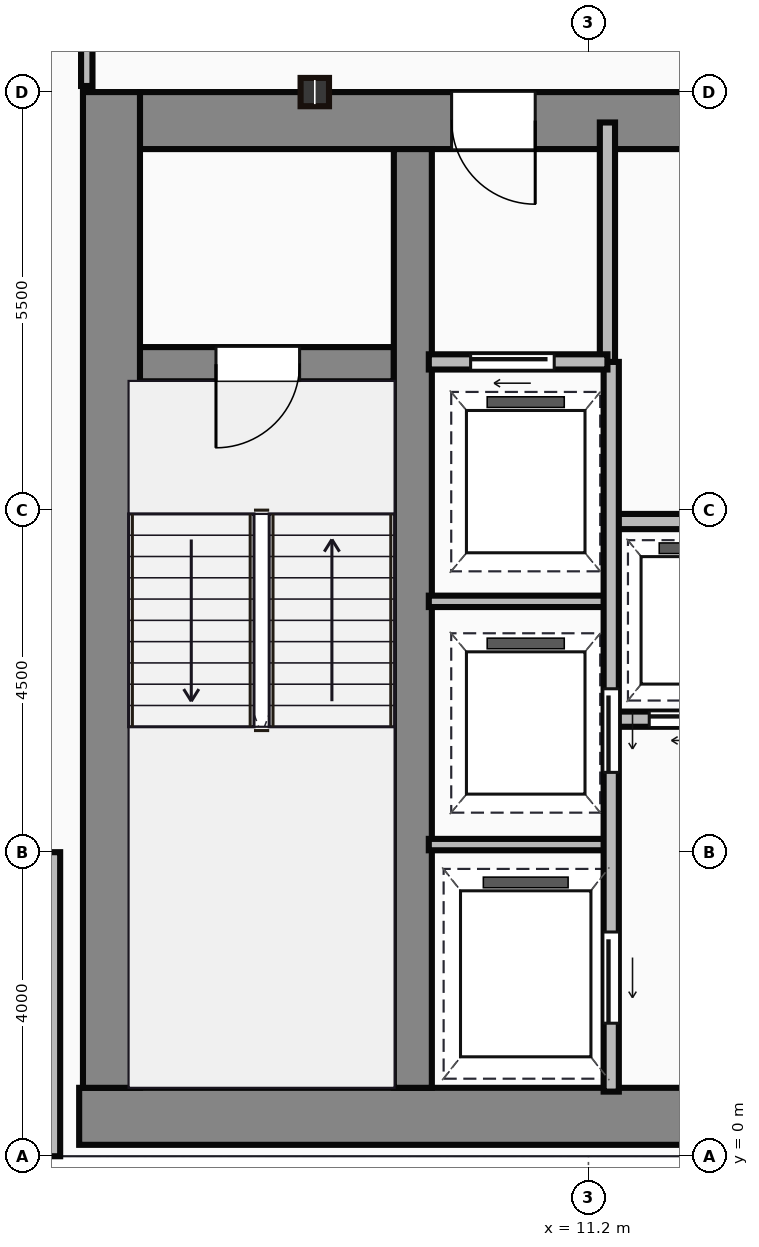
"""IFC4 building model, lengths in metres.
Left out: names, types, materials, properties, quantities, classifications, styles, units other than length and angle.
Written with IfcOpenShell. Run it as: python <this file> out.ifc"""

import sys

from ifc_helpers import new_model, si_unit, direction, frame, frame_2d, origin, origin_2d, place, context, subcontext, project, spatial, rectangle, i_section, extrude, source, transform, mapped, element, fill, save


model = new_model("IFC4")
c1 = context("Model", 3, precision=1e-05, world=origin(), true_north=direction((0.0, 1.0)))
c2 = subcontext(c1, "Body", "Model", "MODEL_VIEW")
j1 = project(units=[si_unit("LENGTHUNIT", "METRE"), si_unit("PLANEANGLEUNIT", "RADIAN")], contexts=[c1])
p1 = place(None, origin())
s1 = spatial("IfcSite", under=j1, at=p1, CompositionType="ELEMENT")
p2 = place(p1, origin())
s2 = spatial("IfcBuilding", under=s1, at=p2, CompositionType="ELEMENT")
p3 = place(p2, frame((0.0, 0.0, 162.5)))
s3 = spatial("IfcBuildingStorey", under=s2, at=p3, CompositionType="ELEMENT", Elevation=162.5)
m1 = source(origin(), c2, "Body", "SweptSolid", [
    extrude(rectangle(XDim=29.5, YDim=0.75, at=frame_2d((14.75, 0.0))), origin(), (0.0, 0.0, 1.0), 3.65),
])
p4 = place(p3, frame((4.5, 0.525, 0.0), z_axis=(0.0, 0.0, 1.0), x_axis=(1.0, 0.0, 0.0)))
e1 = element("IfcWall", 1, at=p4, inside=s3, PredefinedType="SHEAR", context=c2, shape_type="MappedRepresentation", body=[
    mapped(m1, transform((0.0, 0.0, 0.0))),
])
m2 = source(origin(), c2, "Body", "SweptSolid", [
    extrude(rectangle(XDim=13.1, YDim=0.75, at=frame_2d((6.55, 0.0))), origin(), (0.0, 0.0, 1.0), 3.65),
])
p5 = place(p3, frame((4.925, 0.9, 0.0), z_axis=(0.0, 0.0, 1.0), x_axis=(0.0, 1.0, 0.0)))
e2 = element("IfcWall", 2, at=p5, inside=s3, PredefinedType="SHEAR", context=c2, shape_type="MappedRepresentation", body=[
    mapped(m2, transform((0.0, 0.0, 0.0))),
])
m3 = source(origin(), c2, "Body", "SweptSolid", [
    extrude(rectangle(XDim=9.1, YDim=0.75, at=frame_2d((4.55, 0.0))), origin(), (0.0, 0.0, 1.0), 3.65),
])
p6 = place(p3, frame((5.3, 13.625, 0.0), z_axis=(0.0, 0.0, 1.0), x_axis=(1.0, 0.0, 0.0)))
e3 = element("IfcWall", 3, at=p6, inside=s3, PredefinedType="SHEAR", context=c2, shape_type="MappedRepresentation", body=[
    mapped(m3, transform((0.0, 0.0, 0.0))),
])
p7 = place(p6, frame((4.1, 0.0, 0.0)))
e4 = element("IfcOpeningElement", 4, at=p7, cuts=e3, PredefinedType="OPENING", context=c2, shape_type="SweptSolid", body=[
    extrude(rectangle(XDim=1.1, YDim=2.15, at=frame_2d((0.55, 1.075))), frame((0.0, 0.385, 0.0), z_axis=(0.0, -1.0, 0.0), x_axis=(1.0, 0.0, 0.0)), (0.0, 0.0, 1.0), 0.77),
])
m4 = source(origin(), c2, "Body", "SweptSolid", [
    extrude(rectangle(XDim=12.35, YDim=0.5, at=frame_2d((6.175, 0.0))), origin(), (0.0, 0.0, 1.0), 3.65),
])
p8 = place(p3, frame((8.89, 0.9, 0.0), z_axis=(0.0, 0.0, 1.0), x_axis=(0.0, 1.0, 0.0)))
e5 = element("IfcWall", 5, at=p8, inside=s3, PredefinedType="SHEAR", context=c2, shape_type="MappedRepresentation", body=[
    mapped(m4, transform((0.0, 0.0, 0.0))),
])
m5 = source(origin(), c2, "Body", "SweptSolid", [
    extrude(rectangle(XDim=3.39, YDim=0.45, at=frame_2d((1.695, 0.0))), origin(), (0.0, 0.0, 1.0), 3.65),
])
p9 = place(p3, frame((5.25, 10.42, 0.0), z_axis=(0.0, 0.0, 1.0), x_axis=(1.0, 0.0, 0.0)))
e6 = element("IfcWall", 6, at=p9, inside=s3, PredefinedType="SHEAR", context=c2, shape_type="MappedRepresentation", body=[
    mapped(m5, transform((0.0, 0.0, 0.0))),
])
p10 = place(p9, frame((1.05, 0.0, 0.0)))
e7 = element("IfcOpeningElement", 7, at=p10, cuts=e6, PredefinedType="OPENING", context=c2, shape_type="SweptSolid", body=[
    extrude(rectangle(XDim=1.1, YDim=2.15, at=frame_2d((0.55, 1.075))), frame((0.0, 0.235, 0.0), z_axis=(0.0, -1.0, 0.0), x_axis=(1.0, 0.0, 0.0)), (0.0, 0.0, 1.0), 0.47),
])
m6 = source(origin(), c2, "Body", "SweptSolid", [
    extrude(i_section(OverallWidth=0.374, OverallDepth=0.372, WebThickness=0.016, FlangeThickness=0.026, at=origin_2d()), origin(), (0.0, 0.0, 1.0), 3.65),
])
p11 = place(p3, frame((7.6, 14.0, 0.0), z_axis=(0.0, 0.0, 1.0), x_axis=(1.0, 0.0, 0.0)))
e8 = element("IfcColumn", 8, at=p11, inside=s3, PredefinedType="COLUMN", context=c2, shape_type="MappedRepresentation", body=[
    mapped(m6, transform((0.0, 0.0, 0.0))),
])
m7 = source(origin(), c2, "Body", "SweptSolid", [
    extrude(rectangle(XDim=4.0, YDim=0.25, at=frame_2d((2.0, 0.0))), origin(), (0.0, 0.0, 1.0), 3.4),
])
p12 = place(p3, frame((4.125, 4.0, 0.0), z_axis=(0.0, 0.0, 1.0), x_axis=(0.0, -1.0, 0.0)))
e9 = element("IfcWall", 9, at=p12, inside=s3, PredefinedType="STANDARD", context=c2, shape_type="MappedRepresentation", body=[
    mapped(m7, transform((0.0, 0.0, 0.0))),
])
m8 = source(origin(), c2, "Body", "SweptSolid", [
    extrude(rectangle(XDim=3.18, YDim=0.2, at=frame_2d((1.59, 0.0))), origin(), (0.0, 0.0, 1.0), 3.4),
])
p13 = place(p3, frame((11.45, 10.42, 0.0), z_axis=(0.0, 0.0, 1.0), x_axis=(0.0, 1.0, 0.0)))
e10 = element("IfcWall", 10, at=p13, inside=s3, PredefinedType="PARTITIONING", context=c2, shape_type="MappedRepresentation", body=[
    mapped(m8, transform((0.0, 0.0, 0.0))),
])
m9 = source(origin(), c2, "Body", "SweptSolid", [
    extrude(rectangle(XDim=2.35, YDim=0.2, at=frame_2d((1.175, 0.0))), origin(), (0.0, 0.0, 1.0), 3.4),
])
p14 = place(p3, frame((9.1, 10.45, 0.0), z_axis=(0.0, 0.0, 1.0), x_axis=(1.0, 0.0, 0.0)))
e11 = element("IfcWall", 11, at=p14, inside=s3, PredefinedType="PARTITIONING", context=c2, shape_type="MappedRepresentation", body=[
    mapped(m9, transform((0.0, 0.0, 0.0))),
])
p15 = place(p14, frame((0.55, 0.0, 0.0)))
e12 = element("IfcOpeningElement", 12, at=p15, cuts=e11, PredefinedType="OPENING", context=c2, shape_type="SweptSolid", body=[
    extrude(rectangle(XDim=1.1, YDim=2.15, at=frame_2d((0.55, 1.075))), frame((0.0, 0.11, 0.0), z_axis=(0.0, -1.0, 0.0), x_axis=(1.0, 0.0, 0.0)), (0.0, 0.0, 1.0), 0.22),
])
m10 = source(origin(), c2, "Body", "SweptSolid", [
    extrude(rectangle(XDim=9.6, YDim=0.2, at=frame_2d((4.8, 0.0))), origin(), (0.0, 0.0, 1.0), 3.4),
])
p16 = place(p3, frame((11.5, 0.85, 0.0), z_axis=(0.0, 0.0, 1.0), x_axis=(0.0, 1.0, 0.0)))
e13 = element("IfcWall", 13, at=p16, inside=s3, PredefinedType="PARTITIONING", context=c2, shape_type="MappedRepresentation", body=[
    mapped(m10, transform((0.0, 0.0, 0.0))),
])
p17 = place(p16, frame((4.2, 0.0, 0.0)))
e14 = element("IfcOpeningElement", 14, at=p17, cuts=e13, PredefinedType="OPENING", context=c2, shape_type="SweptSolid", body=[
    extrude(rectangle(XDim=1.1, YDim=2.15, at=frame_2d((0.55, 1.075))), frame((0.0, 0.11, 0.0), z_axis=(0.0, -1.0, 0.0), x_axis=(1.0, 0.0, 0.0)), (0.0, 0.0, 1.0), 0.22),
])
p18 = place(p16, frame((0.9, 0.0, 0.0)))
e15 = element("IfcOpeningElement", 15, at=p18, cuts=e13, PredefinedType="OPENING", context=c2, shape_type="SweptSolid", body=[
    extrude(rectangle(XDim=1.2, YDim=2.15, at=frame_2d((0.6, 1.075))), frame((0.0, 0.11, 0.0), z_axis=(0.0, -1.0, 0.0), x_axis=(1.0, 0.0, 0.0)), (0.0, 0.0, 1.0), 0.22),
])
m11 = source(origin(), c2, "Body", "SweptSolid", [
    extrude(rectangle(XDim=2.4, YDim=0.15, at=frame_2d((1.2, 0.0))), origin(), (0.0, 0.0, 1.0), 3.4),
])
for number, where, z_axis, x_axis in (
    (16, (9.1, 4.1, 0.0), (0.0, 0.0, 1.0), (1.0, 0.0, 0.0)),
    (17, (9.1, 7.3, 0.0), (0.0, 0.0, 1.0), (1.0, 0.0, 0.0)),
):
    element("IfcWall", number, at=place(p3, frame(where, z_axis=z_axis, x_axis=x_axis)), inside=s3, PredefinedType="PARTITIONING", context=c2, shape_type="MappedRepresentation", body=[
        mapped(m11, transform((0.0, 0.0, 0.0))),
    ])
m12 = source(origin(), c2, "Body", "SweptSolid", [
    extrude(rectangle(XDim=11.85, YDim=0.2, at=frame_2d((5.925, 0.0))), origin(), (0.0, 0.0, 1.0), 3.4),
])
p19 = place(p3, frame((11.55, 5.75, 0.0), z_axis=(0.0, 0.0, 1.0), x_axis=(1.0, 0.0, 0.0)))
e18 = element("IfcWall", 18, at=p19, inside=s3, PredefinedType="PARTITIONING", context=c2, shape_type="MappedRepresentation", body=[
    mapped(m12, transform((0.0, 0.0, 0.0))),
])
p20 = place(p19, frame((0.45, 0.0, 0.0)))
e19 = element("IfcOpeningElement", 19, at=p20, cuts=e18, PredefinedType="OPENING", context=c2, shape_type="SweptSolid", body=[
    extrude(rectangle(XDim=1.05, YDim=2.15, at=frame_2d((0.525, 1.075))), frame((0.0, 0.11, 0.0), z_axis=(0.0, -1.0, 0.0), x_axis=(1.0, 0.0, 0.0)), (0.0, 0.0, 1.0), 0.22),
])
p21 = place(p19, frame((2.4, 0.0, 0.0)))
e20 = element("IfcOpeningElement", 20, at=p21, cuts=e18, PredefinedType="OPENING", context=c2, shape_type="SweptSolid", body=[
    extrude(rectangle(XDim=1.05, YDim=2.15, at=frame_2d((0.525, 1.075))), frame((0.0, 0.11, 0.0), z_axis=(0.0, -1.0, 0.0), x_axis=(1.0, 0.0, 0.0)), (0.0, 0.0, 1.0), 0.22),
])
p22 = place(p19, frame((4.35, 0.0, 0.0)))
e21 = element("IfcOpeningElement", 21, at=p22, cuts=e18, PredefinedType="OPENING", context=c2, shape_type="SweptSolid", body=[
    extrude(rectangle(XDim=1.05, YDim=2.15, at=frame_2d((0.525, 1.075))), frame((0.0, 0.11, 0.0), z_axis=(0.0, -1.0, 0.0), x_axis=(1.0, 0.0, 0.0)), (0.0, 0.0, 1.0), 0.22),
])
p23 = place(p19, frame((6.3, 0.0, 0.0)))
e22 = element("IfcOpeningElement", 22, at=p23, cuts=e18, PredefinedType="OPENING", context=c2, shape_type="SweptSolid", body=[
    extrude(rectangle(XDim=1.05, YDim=2.15, at=frame_2d((0.525, 1.075))), frame((0.0, 0.11, 0.0), z_axis=(0.0, -1.0, 0.0), x_axis=(1.0, 0.0, 0.0)), (0.0, 0.0, 1.0), 0.22),
])
p24 = place(p19, frame((8.25, 0.0, 0.0)))
e23 = element("IfcOpeningElement", 23, at=p24, cuts=e18, PredefinedType="OPENING", context=c2, shape_type="SweptSolid", body=[
    extrude(rectangle(XDim=1.05, YDim=2.15, at=frame_2d((0.525, 1.075))), frame((0.0, 0.11, 0.0), z_axis=(0.0, -1.0, 0.0), x_axis=(1.0, 0.0, 0.0)), (0.0, 0.0, 1.0), 0.22),
])
p25 = place(p19, frame((10.2, 0.0, 0.0)))
e24 = element("IfcOpeningElement", 24, at=p25, cuts=e18, PredefinedType="OPENING", context=c2, shape_type="SweptSolid", body=[
    extrude(rectangle(XDim=1.05, YDim=2.15, at=frame_2d((0.525, 1.075))), frame((0.0, 0.11, 0.0), z_axis=(0.0, -1.0, 0.0), x_axis=(1.0, 0.0, 0.0)), (0.0, 0.0, 1.0), 0.22),
])
p26 = place(p3, frame((11.55, 8.35, 0.0), z_axis=(0.0, 0.0, 1.0), x_axis=(1.0, 0.0, 0.0)))
e25 = element("IfcWall", 25, at=p26, inside=s3, PredefinedType="PARTITIONING", context=c2, shape_type="MappedRepresentation", body=[
    mapped(m12, transform((0.0, 0.0, 0.0))),
])
m13 = source(origin(), c2, "Body", "SweptSolid", [
    extrude(rectangle(XDim=2.22, YDim=0.15, at=frame_2d((1.11, 0.0))), origin(), (0.0, 0.0, 1.0), 3.4),
])
p27 = place(p3, frame((4.6, 14.08, 0.0), z_axis=(0.0, 0.0, 1.0), x_axis=(0.0, 1.0, 0.0)))
e26 = element("IfcWall", 26, at=p27, inside=s3, PredefinedType="PARTITIONING", context=c2, shape_type="MappedRepresentation", body=[
    mapped(m13, transform((0.0, 0.0, 0.0))),
])
m14 = source(origin(), c2, "Body", "SweptSolid", [
    extrude(rectangle(XDim=1.1, YDim=2.15, at=frame_2d((0.55, 1.075))), frame((0.0, 0.025, 0.0), z_axis=(0.0, -1.0, 0.0), x_axis=(1.0, 0.0, 0.0)), (0.0, 0.0, 1.0), 0.05),
])
p28 = place(p10, frame((1.1, 0.0, 0.0), z_axis=(0.0, 0.0, 1.0), x_axis=(-1.0, 0.0, 0.0)))
e27 = element("IfcDoor", 27, at=p28, inside=s3, OperationType="SINGLE_SWING_LEFT", PredefinedType="DOOR", context=c2, shape_type="MappedRepresentation", body=[
    mapped(m14, transform((0.0, 0.0, 0.0))),
])
fill(e7, e27)
p29 = place(p7, origin())
e28 = element("IfcDoor", 28, at=p29, inside=s3, OperationType="SINGLE_SWING_RIGHT", PredefinedType="DOOR", context=c2, shape_type="MappedRepresentation", body=[
    mapped(m14, transform((0.0, 0.0, 0.0))),
])
fill(e4, e28)
p30 = place(p15, origin())
e29 = element("IfcDoor", 29, at=p30, inside=s3, OperationType="SLIDING_TO_LEFT", PredefinedType="DOOR", context=c2, shape_type="MappedRepresentation", body=[
    mapped(m14, transform((0.0, 0.0, 0.0))),
])
fill(e12, e29)
p31 = place(p17, frame((1.1, 0.0, 0.0), z_axis=(0.0, 0.0, 1.0), x_axis=(-1.0, 0.0, 0.0)))
e30 = element("IfcDoor", 30, at=p31, inside=s3, OperationType="SLIDING_TO_LEFT", PredefinedType="DOOR", context=c2, shape_type="MappedRepresentation", body=[
    mapped(m14, transform((0.0, 0.0, 0.0))),
])
fill(e14, e30)
m15 = source(origin(), c2, "Body", "SweptSolid", [
    extrude(rectangle(XDim=1.2, YDim=2.15, at=frame_2d((0.6, 1.075))), frame((0.0, 0.025, 0.0), z_axis=(0.0, -1.0, 0.0), x_axis=(1.0, 0.0, 0.0)), (0.0, 0.0, 1.0), 0.05),
])
p32 = place(p18, frame((1.2, 0.0, 0.0), z_axis=(0.0, 0.0, 1.0), x_axis=(-1.0, 0.0, 0.0)))
e31 = element("IfcDoor", 31, at=p32, inside=s3, OperationType="SLIDING_TO_LEFT", PredefinedType="DOOR", context=c2, shape_type="MappedRepresentation", body=[
    mapped(m15, transform((0.0, 0.0, 0.0))),
])
fill(e15, e31)
m16 = source(origin(), c2, "Body", "SweptSolid", [
    extrude(rectangle(XDim=1.05, YDim=2.15, at=frame_2d((0.525, 1.075))), frame((0.0, 0.025, 0.0), z_axis=(0.0, -1.0, 0.0), x_axis=(1.0, 0.0, 0.0)), (0.0, 0.0, 1.0), 0.05),
])
p33 = place(p20, frame((1.05, 0.0, 0.0), z_axis=(0.0, 0.0, 1.0), x_axis=(-1.0, 0.0, 0.0)))
e32 = element("IfcDoor", 32, at=p33, inside=s3, OperationType="SLIDING_TO_LEFT", PredefinedType="DOOR", context=c2, shape_type="MappedRepresentation", body=[
    mapped(m16, transform((0.0, 0.0, 0.0))),
])
fill(e19, e32)
save(model, sys.argv[1])
